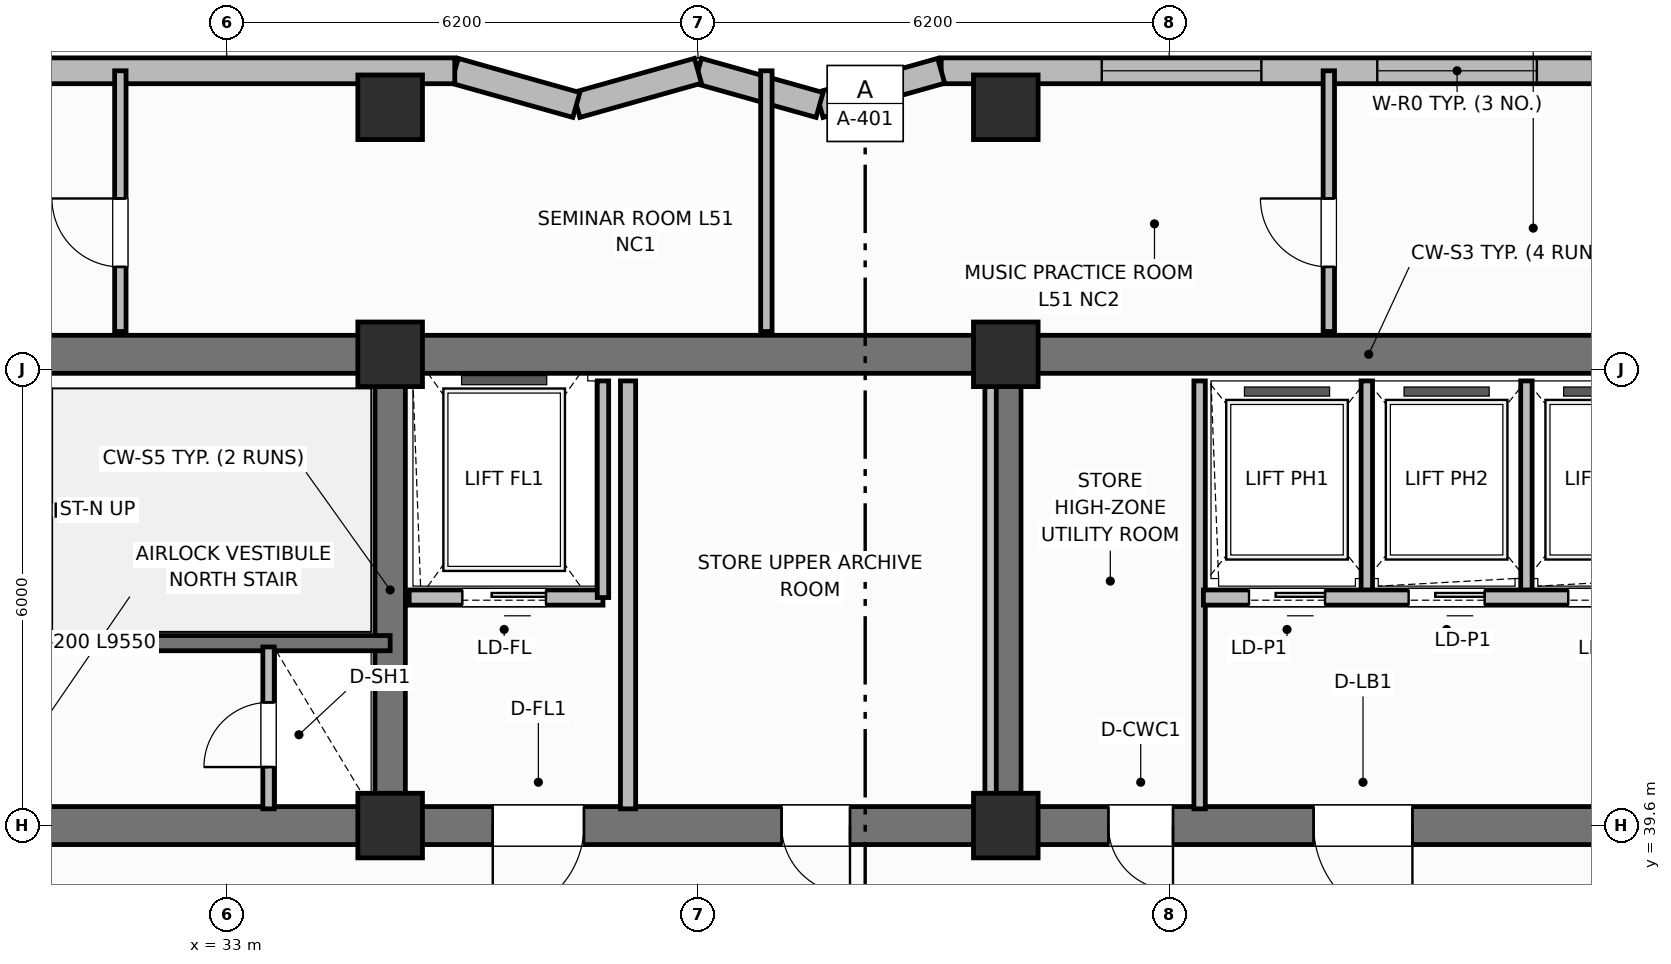
"""IFC4 building model, lengths in metres.
Left out: names, types, materials, properties, quantities, classifications, styles, units other than length and angle.
Written with IfcOpenShell. Run it as: python <this file> out.ifc"""

import sys

from ifc_helpers import new_model, si_unit, direction, frame, frame_2d, origin, origin_2d, place, context, subcontext, project, spatial, rectangle, extrude, element, fill, save


model = new_model("IFC4")
c1 = context("Model", 3, precision=1e-05, world=origin(), true_north=direction((0.0, 1.0)))
c2 = subcontext(c1, "Body", "Model", "MODEL_VIEW")
j1 = project(units=[si_unit("LENGTHUNIT", "METRE"), si_unit("PLANEANGLEUNIT", "RADIAN")], contexts=[c1])
p1 = place(None, origin())
s1 = spatial("IfcSite", under=j1, at=p1, CompositionType="ELEMENT")
p2 = place(p1, origin())
s2 = spatial("IfcBuilding", under=s1, at=p2, CompositionType="ELEMENT")
p3 = place(p2, frame((0.0, 0.0, 207.3)))
s3 = spatial("IfcBuildingStorey", under=s2, at=p3, CompositionType="ELEMENT", Elevation=207.3)
p4 = place(p3, frame((25.6, 45.8, 0.0), z_axis=(0.0, 0.0, 1.0), x_axis=(1.0, 0.0, 0.0)))
e1 = element("IfcWall", 1, at=p4, inside=s3, PredefinedType="SHEAR", context=c2, shape_type="SweptSolid", body=[
    extrude(rectangle(XDim=27.2, YDim=0.5, at=frame_2d((13.6, 0.0))), origin(), (0.0, 0.0, 1.0), 3.7),
])
p5 = place(p3, frame((52.8, 39.6, 0.0), z_axis=(0.0, 0.0, 1.0), x_axis=(-1.0, 0.0, 0.0)))
e2 = element("IfcWall", 2, at=p5, inside=s3, PredefinedType="SHEAR", context=c2, shape_type="SweptSolid", body=[
    extrude(rectangle(XDim=27.2, YDim=0.5, at=frame_2d((13.6, 0.0))), origin(), (0.0, 0.0, 1.0), 3.7),
])
p6 = place(p5, frame((24.2, 0.0, 0.0)))
e3 = element("IfcOpeningElement", 3, at=p6, cuts=e2, PredefinedType="OPENING", context=c2, shape_type="SweptSolid", body=[
    extrude(rectangle(XDim=1.1, YDim=2.15, at=frame_2d((0.55, 1.075))), frame((0.0, 0.26, 0.0), z_axis=(0.0, -1.0, 0.0), x_axis=(1.0, 0.0, 0.0)), (0.0, 0.0, 1.0), 0.52),
])
p7 = place(p5, frame((15.1, 0.0, 0.0)))
e4 = element("IfcOpeningElement", 4, at=p7, cuts=e2, PredefinedType="OPENING", context=c2, shape_type="SweptSolid", body=[
    extrude(rectangle(XDim=1.2, YDim=2.15, at=frame_2d((0.6, 1.075))), frame((0.0, 0.26, 0.0), z_axis=(0.0, -1.0, 0.0), x_axis=(1.0, 0.0, 0.0)), (0.0, 0.0, 1.0), 0.52),
])
p8 = place(p5, frame((11.6, 0.0, 0.0)))
e5 = element("IfcOpeningElement", 5, at=p8, cuts=e2, PredefinedType="OPENING", context=c2, shape_type="SweptSolid", body=[
    extrude(rectangle(XDim=0.9, YDim=2.1, at=frame_2d((0.45, 1.05))), frame((0.0, 0.26, 0.0), z_axis=(0.0, -1.0, 0.0), x_axis=(1.0, 0.0, 0.0)), (0.0, 0.0, 1.0), 0.52),
])
p9 = place(p5, frame((7.35, 0.0, 0.0)))
e6 = element("IfcOpeningElement", 6, at=p9, cuts=e2, PredefinedType="OPENING", context=c2, shape_type="SweptSolid", body=[
    extrude(rectangle(XDim=0.85, YDim=2.1, at=frame_2d((0.425, 1.05))), frame((0.0, 0.26, 0.0), z_axis=(0.0, -1.0, 0.0), x_axis=(1.0, 0.0, 0.0)), (0.0, 0.0, 1.0), 0.52),
])
p10 = place(p5, frame((4.2, 0.0, 0.0)))
e7 = element("IfcOpeningElement", 7, at=p10, cuts=e2, PredefinedType="OPENING", context=c2, shape_type="SweptSolid", body=[
    extrude(rectangle(XDim=1.3, YDim=2.2, at=frame_2d((0.65, 1.1))), frame((0.0, 0.26, 0.0), z_axis=(0.0, -1.0, 0.0), x_axis=(1.0, 0.0, 0.0)), (0.0, 0.0, 1.0), 0.52),
])
for number, where, z_axis, x_axis in (
    (8, (35.15, 39.85, 0.0), (0.0, 0.0, 1.0), (0.0, 1.0, 0.0)),
    (9, (43.25, 39.85, 0.0), (0.0, 0.0, 1.0), (0.0, 1.0, 0.0)),
):
    element("IfcWall", number, at=place(p3, frame(where, z_axis=z_axis, x_axis=x_axis)), inside=s3, PredefinedType="SHEAR", context=c2, shape_type="SweptSolid", body=[
        extrude(rectangle(XDim=5.7, YDim=0.4, at=frame_2d((2.85, 0.0))), origin(), (0.0, 0.0, 1.0), 3.7),
    ])
for number, where, z_axis, x_axis in (
    (10, (35.15, 39.6, 0.0), (0.0, 0.0, 1.0), (1.0, 0.0, 0.0)),
    (11, (35.15, 45.8, 0.0), (0.0, 0.0, 1.0), (1.0, 0.0, 0.0)),
    (12, (43.25, 39.6, 0.0), (0.0, 0.0, 1.0), (1.0, 0.0, 0.0)),
    (13, (43.25, 45.8, 0.0), (0.0, 0.0, 1.0), (1.0, 0.0, 0.0)),
    (14, (35.15, 49.05, 0.0), (0.0, 0.0, 1.0), (1.0, 0.0, 0.0)),
    (15, (43.25, 49.05, 0.0), (0.0, 0.0, 1.0), (1.0, 0.0, 0.0)),
):
    element("IfcColumn", number, at=place(p3, frame(where, z_axis=z_axis, x_axis=x_axis)), inside=s3, PredefinedType="COLUMN", context=c2, shape_type="SweptSolid", body=[
        extrude(rectangle(XDim=0.85, YDim=0.85, at=origin_2d()), origin(), (0.0, 0.0, 1.0), 3.7),
    ])
p11 = place(p3, frame((58.2, 49.53, 0.0), z_axis=(0.0, 0.0, 1.0), x_axis=(-1.0, 0.0, 0.0)))
e16 = element("IfcWall", 16, at=p11, inside=s3, PredefinedType="SOLIDWALL", context=c2, shape_type="SweptSolid", body=[
    extrude(rectangle(XDim=15.8, YDim=0.34, at=frame_2d((7.9, 0.0))), origin(), (0.0, 0.0, 1.0), 2.72),
])
p12 = place(p11, frame((7.962, 0.0, 0.7)))
e17 = element("IfcOpeningElement", 17, at=p12, cuts=e16, PredefinedType="OPENING", context=c2, shape_type="SweptSolid", body=[
    extrude(rectangle(XDim=2.1, YDim=1.9, at=frame_2d((1.05, 0.95))), frame((0.0, 0.18, 0.0), z_axis=(0.0, -1.0, 0.0), x_axis=(1.0, 0.0, 0.0)), (0.0, 0.0, 1.0), 0.36),
])
p13 = place(p11, frame((11.587, 0.0, 0.7)))
e18 = element("IfcOpeningElement", 18, at=p13, cuts=e16, PredefinedType="OPENING", context=c2, shape_type="SweptSolid", body=[
    extrude(rectangle(XDim=2.1, YDim=1.9, at=frame_2d((1.05, 0.95))), frame((0.0, 0.18, 0.0), z_axis=(0.0, -1.0, 0.0), x_axis=(1.0, 0.0, 0.0)), (0.0, 0.0, 1.0), 0.36),
])
p14 = place(p3, frame((42.4, 49.53, 0.0), z_axis=(0.0, 0.0, 1.0), x_axis=(-0.962652136636, -0.270741322725, 0.0)))
e19 = element("IfcWall", 19, at=p14, inside=s3, PredefinedType="SOLIDWALL", context=c2, shape_type="SweptSolid", body=[
    extrude(rectangle(XDim=1.662, YDim=0.34, at=frame_2d((0.831, 0.0))), origin(), (0.0, 0.0, 1.0), 2.72),
])
p15 = place(p3, frame((40.8, 49.08, 0.0), z_axis=(0.0, 0.0, 1.0), x_axis=(-0.962662902433, 0.270703040766, 0.0)))
e20 = element("IfcWall", 20, at=p15, inside=s3, PredefinedType="SOLIDWALL", context=c2, shape_type="SweptSolid", body=[
    extrude(rectangle(XDim=1.662, YDim=0.34, at=frame_2d((0.831, 0.0))), origin(), (0.0, 0.0, 1.0), 2.72),
])
p16 = place(p3, frame((39.2, 49.53, 0.0), z_axis=(0.0, 0.0, 1.0), x_axis=(-0.962652136636, -0.270741322725, 0.0)))
e21 = element("IfcWall", 21, at=p16, inside=s3, PredefinedType="SOLIDWALL", context=c2, shape_type="SweptSolid", body=[
    extrude(rectangle(XDim=1.662, YDim=0.34, at=frame_2d((0.831, 0.0))), origin(), (0.0, 0.0, 1.0), 2.72),
])
p17 = place(p3, frame((37.6, 49.08, 0.0), z_axis=(0.0, 0.0, 1.0), x_axis=(-0.962662902433, 0.270703040766, 0.0)))
e22 = element("IfcWall", 22, at=p17, inside=s3, PredefinedType="SOLIDWALL", context=c2, shape_type="SweptSolid", body=[
    extrude(rectangle(XDim=1.662, YDim=0.34, at=frame_2d((0.831, 0.0))), origin(), (0.0, 0.0, 1.0), 2.72),
])
p18 = place(p3, frame((36.0, 49.53, 0.0), z_axis=(0.0, 0.0, 1.0), x_axis=(-1.0, 0.0, 0.0)))
e23 = element("IfcWall", 23, at=p18, inside=s3, PredefinedType="SOLIDWALL", context=c2, shape_type="SweptSolid", body=[
    extrude(rectangle(XDim=15.8, YDim=0.34, at=frame_2d((7.9, 0.0))), origin(), (0.0, 0.0, 1.0), 2.72),
])
p19 = place(p18, frame((6.85, 0.0, 0.7)))
e24 = element("IfcOpeningElement", 24, at=p19, cuts=e23, PredefinedType="OPENING", context=c2, shape_type="SweptSolid", body=[
    extrude(rectangle(XDim=2.1, YDim=1.9, at=frame_2d((1.05, 0.95))), frame((0.0, 0.18, 0.0), z_axis=(0.0, -1.0, 0.0), x_axis=(1.0, 0.0, 0.0)), (0.0, 0.0, 1.0), 0.36),
])
p20 = place(p3, frame((35.15, 42.0, 0.0), z_axis=(0.0, 0.0, 1.0), x_axis=(-1.0, 0.0, 0.0)))
e25 = element("IfcWall", 25, at=p20, inside=s3, PredefinedType="SHEAR", context=c2, shape_type="SweptSolid", body=[
    extrude(rectangle(XDim=9.55, YDim=0.2, at=frame_2d((4.775, 0.0))), origin(), (0.0, 0.0, 1.0), 3.7),
])
p21 = place(p20, frame((7.25, 0.0, 0.0)))
e26 = element("IfcOpeningElement", 26, at=p21, cuts=e25, PredefinedType="OPENING", context=c2, shape_type="SweptSolid", body=[
    extrude(rectangle(XDim=1.1, YDim=2.15, at=frame_2d((0.55, 1.075))), frame((0.0, 0.11, 0.0), z_axis=(0.0, -1.0, 0.0), x_axis=(1.0, 0.0, 0.0)), (0.0, 0.0, 1.0), 0.22),
])
p22 = place(p3, frame((33.55, 39.82, 0.0), z_axis=(0.0, 0.0, 1.0), x_axis=(0.0, 1.0, 0.0)))
e27 = element("IfcWall", 27, at=p22, inside=s3, PredefinedType="PARTITIONING", context=c2, shape_type="SweptSolid", body=[
    extrude(rectangle(XDim=2.13, YDim=0.15, at=frame_2d((1.065, 0.0))), origin(), (0.0, 0.0, 1.0), 2.55),
])
p23 = place(p22, frame((0.55, 0.0, 0.0)))
e28 = element("IfcOpeningElement", 28, at=p23, cuts=e27, PredefinedType="OPENING", context=c2, shape_type="SweptSolid", body=[
    extrude(rectangle(XDim=0.85, YDim=2.05, at=frame_2d((0.425, 1.025))), frame((0.0, 0.085, 0.0), z_axis=(0.0, -1.0, 0.0), x_axis=(1.0, 0.0, 0.0)), (0.0, 0.0, 1.0), 0.17),
])
p24 = place(p3, frame((37.95, 42.6, 0.0), z_axis=(0.0, 0.0, 1.0), x_axis=(-1.0, 0.0, 0.0)))
e29 = element("IfcWall", 29, at=p24, inside=s3, PredefinedType="PARTITIONING", context=c2, shape_type="SweptSolid", body=[
    extrude(rectangle(XDim=2.55, YDim=0.2, at=frame_2d((1.275, 0.0))), origin(), (0.0, 0.0, 1.0), 2.32),
])
p25 = place(p24, frame((0.75, 0.0, 0.0)))
e30 = element("IfcOpeningElement", 30, at=p25, cuts=e29, PredefinedType="OPENING", context=c2, shape_type="SweptSolid", body=[
    extrude(rectangle(XDim=1.1, YDim=2.15, at=frame_2d((0.55, 1.075))), frame((0.0, 0.11, 0.0), z_axis=(0.0, -1.0, 0.0), x_axis=(1.0, 0.0, 0.0)), (0.0, 0.0, 1.0), 0.22),
])
p26 = place(p3, frame((37.95, 42.6, 0.0), z_axis=(0.0, 0.0, 1.0), x_axis=(0.0, 1.0, 0.0)))
e31 = element("IfcWall", 31, at=p26, inside=s3, PredefinedType="PARTITIONING", context=c2, shape_type="SweptSolid", body=[
    extrude(rectangle(XDim=2.85, YDim=0.15, at=frame_2d((1.425, 0.0))), origin(), (0.0, 0.0, 1.0), 2.55),
])
p27 = place(p3, frame((38.28, 39.82, 0.0), z_axis=(0.0, 0.0, 1.0), x_axis=(0.0, 1.0, 0.0)))
e32 = element("IfcWall", 32, at=p27, inside=s3, PredefinedType="PARTITIONING", context=c2, shape_type="SweptSolid", body=[
    extrude(rectangle(XDim=5.63, YDim=0.2, at=frame_2d((2.815, 0.0))), origin(), (0.0, 0.0, 1.0), 2.55),
])
for number, where, z_axis, x_axis in (
    (33, (43.05, 39.82, 0.0), (0.0, 0.0, 1.0), (0.0, 1.0, 0.0)),
    (34, (45.8, 39.82, 0.0), (0.0, 0.0, 1.0), (0.0, 1.0, 0.0)),
):
    element("IfcWall", number, at=place(p3, frame(where, z_axis=z_axis, x_axis=x_axis)), inside=s3, PredefinedType="PARTITIONING", context=c2, shape_type="SweptSolid", body=[
        extrude(rectangle(XDim=5.63, YDim=0.15, at=frame_2d((2.815, 0.0))), origin(), (0.0, 0.0, 1.0), 2.55),
    ])
for number, where, z_axis, x_axis in (
    (35, (48.0, 42.65, 0.0), (0.0, 0.0, 1.0), (0.0, 1.0, 0.0)),
    (36, (50.1, 42.65, 0.0), (0.0, 0.0, 1.0), (0.0, 1.0, 0.0)),
):
    element("IfcWall", number, at=place(p3, frame(where, z_axis=z_axis, x_axis=x_axis)), inside=s3, PredefinedType="PARTITIONING", context=c2, shape_type="SweptSolid", body=[
        extrude(rectangle(XDim=2.8, YDim=0.15, at=frame_2d((1.4, 0.0))), origin(), (0.0, 0.0, 1.0), 2.55),
    ])
p28 = place(p3, frame((52.35, 42.6, 0.0), z_axis=(0.0, 0.0, 1.0), x_axis=(-1.0, 0.0, 0.0)))
e37 = element("IfcWall", 37, at=p28, inside=s3, PredefinedType="PARTITIONING", context=c2, shape_type="SweptSolid", body=[
    extrude(rectangle(XDim=6.5, YDim=0.2, at=frame_2d((3.25, 0.0))), origin(), (0.0, 0.0, 1.0), 2.55),
])
p29 = place(p28, frame((4.9, 0.0, 0.0)))
e38 = element("IfcOpeningElement", 38, at=p29, cuts=e37, PredefinedType="OPENING", context=c2, shape_type="SweptSolid", body=[
    extrude(rectangle(XDim=1.0, YDim=2.15, at=frame_2d((0.5, 1.075))), frame((0.0, 0.11, 0.0), z_axis=(0.0, -1.0, 0.0), x_axis=(1.0, 0.0, 0.0)), (0.0, 0.0, 1.0), 0.22),
])
p30 = place(p28, frame((2.8, 0.0, 0.0)))
e39 = element("IfcOpeningElement", 39, at=p30, cuts=e37, PredefinedType="OPENING", context=c2, shape_type="SweptSolid", body=[
    extrude(rectangle(XDim=1.0, YDim=2.15, at=frame_2d((0.5, 1.075))), frame((0.0, 0.11, 0.0), z_axis=(0.0, -1.0, 0.0), x_axis=(1.0, 0.0, 0.0)), (0.0, 0.0, 1.0), 0.22),
])
p31 = place(p28, frame((0.7, 0.0, 0.0)))
e40 = element("IfcOpeningElement", 40, at=p31, cuts=e37, PredefinedType="OPENING", context=c2, shape_type="SweptSolid", body=[
    extrude(rectangle(XDim=1.0, YDim=2.15, at=frame_2d((0.5, 1.075))), frame((0.0, 0.11, 0.0), z_axis=(0.0, -1.0, 0.0), x_axis=(1.0, 0.0, 0.0)), (0.0, 0.0, 1.0), 0.22),
])
p32 = place(p3, frame((31.6, 46.1, 0.0), z_axis=(0.0, 0.0, 1.0), x_axis=(0.0, 1.0, 0.0)))
e41 = element("IfcWall", 41, at=p32, inside=s3, PredefinedType="PARTITIONING", context=c2, shape_type="SweptSolid", body=[
    extrude(rectangle(XDim=3.43, YDim=0.15, at=frame_2d((1.715, 0.0))), origin(), (0.0, 0.0, 1.0), 2.55),
])
p33 = place(p32, frame((0.85, 0.0, 0.0)))
e42 = element("IfcOpeningElement", 42, at=p33, cuts=e41, PredefinedType="OPENING", context=c2, shape_type="SweptSolid", body=[
    extrude(rectangle(XDim=0.9, YDim=2.1, at=frame_2d((0.45, 1.05))), frame((0.0, 0.085, 0.0), z_axis=(0.0, -1.0, 0.0), x_axis=(1.0, 0.0, 0.0)), (0.0, 0.0, 1.0), 0.17),
])
p34 = place(p3, frame((40.1, 46.1, 0.0), z_axis=(0.0, 0.0, 1.0), x_axis=(0.0, 1.0, 0.0)))
e43 = element("IfcWall", 43, at=p34, inside=s3, PredefinedType="PARTITIONING", context=c2, shape_type="SweptSolid", body=[
    extrude(rectangle(XDim=3.43, YDim=0.15, at=frame_2d((1.715, 0.0))), origin(), (0.0, 0.0, 1.0), 2.55),
])
p35 = place(p3, frame((47.5, 46.1, 0.0), z_axis=(0.0, 0.0, 1.0), x_axis=(0.0, 1.0, 0.0)))
e44 = element("IfcWall", 44, at=p35, inside=s3, PredefinedType="PARTITIONING", context=c2, shape_type="SweptSolid", body=[
    extrude(rectangle(XDim=3.43, YDim=0.15, at=frame_2d((1.715, 0.0))), origin(), (0.0, 0.0, 1.0), 2.55),
])
p36 = place(p35, frame((0.85, 0.0, 0.0)))
e45 = element("IfcOpeningElement", 45, at=p36, cuts=e44, PredefinedType="OPENING", context=c2, shape_type="SweptSolid", body=[
    extrude(rectangle(XDim=0.9, YDim=2.1, at=frame_2d((0.45, 1.05))), frame((0.0, 0.085, 0.0), z_axis=(0.0, -1.0, 0.0), x_axis=(1.0, 0.0, 0.0)), (0.0, 0.0, 1.0), 0.17),
])
p37 = place(p12, origin())
e46 = element("IfcWindow", 46, at=p37, inside=s3, PartitioningType="SINGLE_PANEL", PredefinedType="WINDOW", context=c2, shape_type="SweptSolid", body=[
    extrude(rectangle(XDim=2.1, YDim=1.9, at=frame_2d((1.05, 0.95))), frame((0.0, 0.03, 0.0), z_axis=(0.0, -1.0, 0.0), x_axis=(1.0, 0.0, 0.0)), (0.0, 0.0, 1.0), 0.06),
])
fill(e17, e46)
p38 = place(p13, origin())
e47 = element("IfcWindow", 47, at=p38, inside=s3, PartitioningType="SINGLE_PANEL", PredefinedType="WINDOW", context=c2, shape_type="SweptSolid", body=[
    extrude(rectangle(XDim=2.1, YDim=1.9, at=frame_2d((1.05, 0.95))), frame((0.0, 0.03, 0.0), z_axis=(0.0, -1.0, 0.0), x_axis=(1.0, 0.0, 0.0)), (0.0, 0.0, 1.0), 0.06),
])
fill(e18, e47)
p39 = place(p23, origin())
e48 = element("IfcDoor", 48, at=p39, inside=s3, OperationType="SINGLE_SWING_LEFT", PredefinedType="TRAPDOOR", context=c2, shape_type="SweptSolid", body=[
    extrude(rectangle(XDim=0.85, YDim=2.05, at=frame_2d((0.425, 1.025))), frame((0.0, 0.025, 0.0), z_axis=(0.0, -1.0, 0.0), x_axis=(1.0, 0.0, 0.0)), (0.0, 0.0, 1.0), 0.05),
])
fill(e28, e48)
p40 = place(p25, origin())
e49 = element("IfcDoor", 49, at=p40, inside=s3, OperationType="SLIDING_TO_LEFT", PredefinedType="DOOR", context=c2, shape_type="SweptSolid", body=[
    extrude(rectangle(XDim=1.1, YDim=2.15, at=frame_2d((0.55, 1.075))), frame((0.0, 0.025, 0.0), z_axis=(0.0, -1.0, 0.0), x_axis=(1.0, 0.0, 0.0)), (0.0, 0.0, 1.0), 0.05),
])
fill(e30, e49)
p41 = place(p29, origin())
e50 = element("IfcDoor", 50, at=p41, inside=s3, OperationType="SLIDING_TO_LEFT", PredefinedType="DOOR", context=c2, shape_type="SweptSolid", body=[
    extrude(rectangle(XDim=1.0, YDim=2.15, at=frame_2d((0.5, 1.075))), frame((0.0, 0.025, 0.0), z_axis=(0.0, -1.0, 0.0), x_axis=(1.0, 0.0, 0.0)), (0.0, 0.0, 1.0), 0.05),
])
fill(e38, e50)
p42 = place(p30, origin())
e51 = element("IfcDoor", 51, at=p42, inside=s3, OperationType="SLIDING_TO_LEFT", PredefinedType="DOOR", context=c2, shape_type="SweptSolid", body=[
    extrude(rectangle(XDim=1.0, YDim=2.15, at=frame_2d((0.5, 1.075))), frame((0.0, 0.025, 0.0), z_axis=(0.0, -1.0, 0.0), x_axis=(1.0, 0.0, 0.0)), (0.0, 0.0, 1.0), 0.05),
])
fill(e39, e51)
p43 = place(p31, origin())
e52 = element("IfcDoor", 52, at=p43, inside=s3, OperationType="SLIDING_TO_LEFT", PredefinedType="DOOR", context=c2, shape_type="SweptSolid", body=[
    extrude(rectangle(XDim=1.0, YDim=2.15, at=frame_2d((0.5, 1.075))), frame((0.0, 0.025, 0.0), z_axis=(0.0, -1.0, 0.0), x_axis=(1.0, 0.0, 0.0)), (0.0, 0.0, 1.0), 0.05),
])
fill(e40, e52)
p44 = place(p33, origin())
e53 = element("IfcDoor", 53, at=p44, inside=s3, OperationType="SINGLE_SWING_RIGHT", PredefinedType="DOOR", context=c2, shape_type="SweptSolid", body=[
    extrude(rectangle(XDim=0.9, YDim=2.1, at=frame_2d((0.45, 1.05))), frame((0.0, 0.025, 0.0), z_axis=(0.0, -1.0, 0.0), x_axis=(1.0, 0.0, 0.0)), (0.0, 0.0, 1.0), 0.05),
])
fill(e42, e53)
p45 = place(p36, origin())
e54 = element("IfcDoor", 54, at=p45, inside=s3, OperationType="SINGLE_SWING_RIGHT", PredefinedType="DOOR", context=c2, shape_type="SweptSolid", body=[
    extrude(rectangle(XDim=0.9, YDim=2.1, at=frame_2d((0.45, 1.05))), frame((0.0, 0.025, 0.0), z_axis=(0.0, -1.0, 0.0), x_axis=(1.0, 0.0, 0.0)), (0.0, 0.0, 1.0), 0.05),
])
fill(e45, e54)
p46 = place(p7, origin())
e55 = element("IfcDoor", 55, at=p46, inside=s3, OperationType="SINGLE_SWING_RIGHT", PredefinedType="DOOR", context=c2, shape_type="SweptSolid", body=[
    extrude(rectangle(XDim=1.2, YDim=2.15, at=frame_2d((0.6, 1.075))), frame((0.0, 0.025, 0.0), z_axis=(0.0, -1.0, 0.0), x_axis=(1.0, 0.0, 0.0)), (0.0, 0.0, 1.0), 0.05),
])
fill(e4, e55)
p47 = place(p8, origin())
e56 = element("IfcDoor", 56, at=p47, inside=s3, OperationType="SINGLE_SWING_LEFT", PredefinedType="DOOR", context=c2, shape_type="SweptSolid", body=[
    extrude(rectangle(XDim=0.9, YDim=2.1, at=frame_2d((0.45, 1.05))), frame((0.0, 0.025, 0.0), z_axis=(0.0, -1.0, 0.0), x_axis=(1.0, 0.0, 0.0)), (0.0, 0.0, 1.0), 0.05),
])
fill(e5, e56)
p48 = place(p9, origin())
e57 = element("IfcDoor", 57, at=p48, inside=s3, OperationType="SINGLE_SWING_LEFT", PredefinedType="DOOR", context=c2, shape_type="SweptSolid", body=[
    extrude(rectangle(XDim=0.85, YDim=2.1, at=frame_2d((0.425, 1.05))), frame((0.0, 0.025, 0.0), z_axis=(0.0, -1.0, 0.0), x_axis=(1.0, 0.0, 0.0)), (0.0, 0.0, 1.0), 0.05),
])
fill(e6, e57)
p49 = place(p10, origin())
e58 = element("IfcDoor", 58, at=p49, inside=s3, OperationType="SINGLE_SWING_LEFT", PredefinedType="DOOR", context=c2, shape_type="SweptSolid", body=[
    extrude(rectangle(XDim=1.3, YDim=2.2, at=frame_2d((0.65, 1.1))), frame((0.0, 0.025, 0.0), z_axis=(0.0, -1.0, 0.0), x_axis=(1.0, 0.0, 0.0)), (0.0, 0.0, 1.0), 0.05),
])
fill(e7, e58)
save(model, sys.argv[1])
